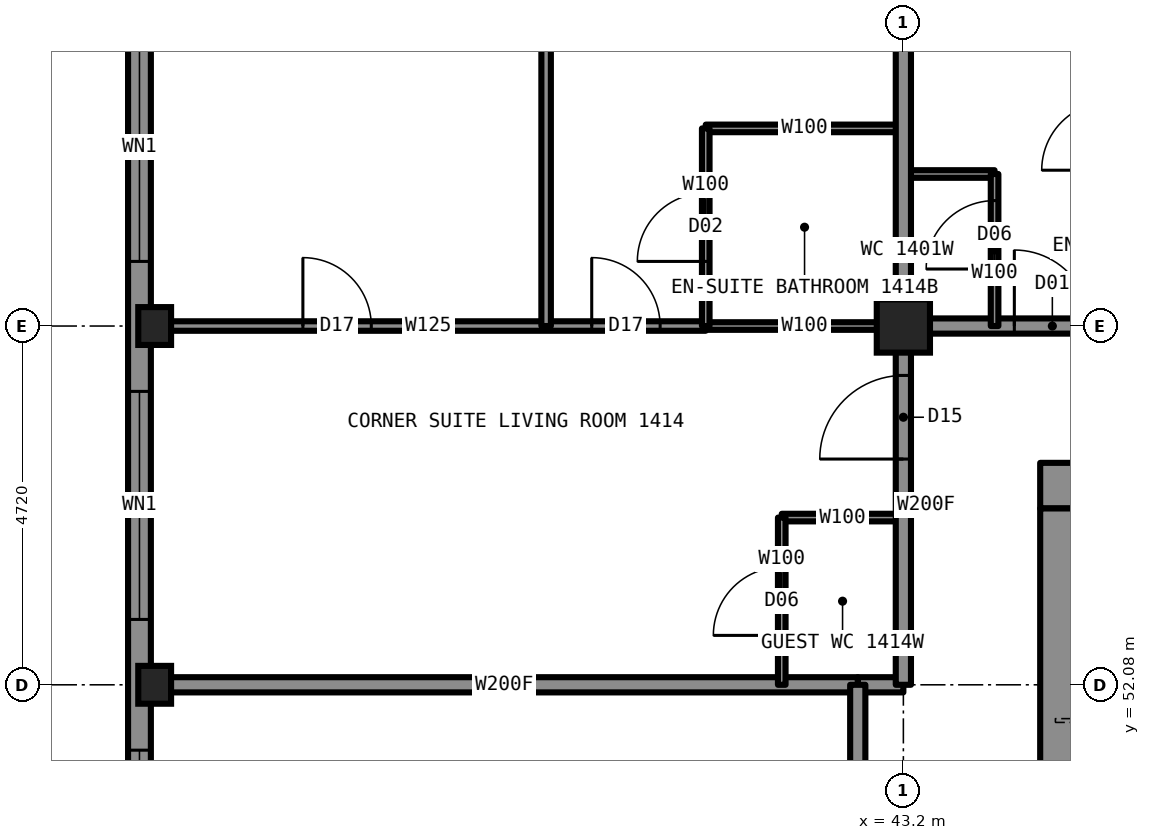
"""IFC4 building model, lengths in metres.
Left out: names, types, materials, properties, quantities, classifications, styles, units other than length and angle.
Written with IfcOpenShell. Run it as: python <this file> out.ifc"""

import sys

from ifc_helpers import new_model, si_unit, direction, frame, frame_2d, origin, origin_2d, place, context, subcontext, project, spatial, rectangle, hollow_rectangle, i_section, extrude, element, fill, save


model = new_model("IFC4")
c1 = context("Model", 3, precision=1e-05, world=origin(), true_north=direction((0.0, 1.0)))
c2 = subcontext(c1, "Body", "Model", "MODEL_VIEW")
j1 = project(units=[si_unit("LENGTHUNIT", "METRE"), si_unit("PLANEANGLEUNIT", "RADIAN")], contexts=[c1])
p1 = place(None, origin())
s1 = spatial("IfcSite", under=j1, at=p1, CompositionType="ELEMENT")
p2 = place(p1, origin())
s2 = spatial("IfcBuilding", under=s1, at=p2, CompositionType="ELEMENT")
p3 = place(p2, frame((0.0, 0.0, 49.5)))
s3 = spatial("IfcBuildingStorey", under=s2, at=p3, CompositionType="ELEMENT", Elevation=49.5)
for number, where, z_axis, x_axis in (
    (1, (33.35, 52.08, 0.0), (0.0, 0.0, 1.0), (1.0, 0.0, 0.0)),
    (2, (33.35, 56.8, 0.0), (0.0, 0.0, 1.0), (1.0, 0.0, 0.0)),
):
    element("IfcColumn", number, at=place(p3, frame(where, z_axis=z_axis, x_axis=x_axis)), inside=s3, PredefinedType="COLUMN", context=c2, shape_type="SweptSolid", body=[
        extrude(i_section(OverallWidth=0.432, OverallDepth=0.498, WebThickness=0.056, FlangeThickness=0.089, at=origin_2d()), origin(), (0.0, 0.0, 1.0), 3.5),
    ])
p4 = place(p3, frame((43.2, 56.8, 0.0), z_axis=(0.0, 0.0, 1.0), x_axis=(1.0, 0.0, 0.0)))
e3 = element("IfcColumn", 3, at=p4, inside=s3, PredefinedType="COLUMN", context=c2, shape_type="SweptSolid", body=[
    extrude(hollow_rectangle(XDim=0.7, YDim=0.7, WallThickness=0.06, at=origin_2d()), origin(), (0.0, 0.0, 1.0), 3.5),
])
p5 = place(p3, frame((45.0, 54.7, 0.0), z_axis=(0.0, 0.0, 1.0), x_axis=(1.0, 0.0, 0.0)))
e4 = element("IfcWall", 4, at=p5, inside=s3, PredefinedType="SHEAR", context=c2, shape_type="SweptSolid", body=[
    extrude(rectangle(XDim=20.0, YDim=0.6, at=frame_2d((10.0, 0.0))), origin(), (0.0, 0.0, 1.0), 3.5),
])
p6 = place(p3, frame((45.3, 35.6, 0.0), z_axis=(0.0, 0.0, 1.0), x_axis=(0.0, 1.0, 0.0)))
e5 = element("IfcWall", 5, at=p6, inside=s3, PredefinedType="SHEAR", context=c2, shape_type="SweptSolid", body=[
    extrude(rectangle(XDim=18.8, YDim=0.6, at=frame_2d((9.4, 0.0))), origin(), (0.0, 0.0, 1.0), 3.5),
])
p7 = place(p6, frame((13.4, 0.0, 0.0)))
e6 = element("IfcOpeningElement", 6, at=p7, cuts=e5, PredefinedType="OPENING", context=c2, shape_type="SweptSolid", body=[
    extrude(rectangle(XDim=1.8, YDim=2.2, at=frame_2d((0.9, 1.1))), frame((0.0, 0.31, 0.0), z_axis=(0.0, -1.0, 0.0), x_axis=(1.0, 0.0, 0.0)), (0.0, 0.0, 1.0), 0.62),
])
p8 = place(p6, frame((3.6, 0.0, 0.0)))
e7 = element("IfcOpeningElement", 7, at=p8, cuts=e5, PredefinedType="OPENING", context=c2, shape_type="SweptSolid", body=[
    extrude(rectangle(XDim=1.8, YDim=2.2, at=frame_2d((0.9, 1.1))), frame((0.0, 0.31, 0.0), z_axis=(0.0, -1.0, 0.0), x_axis=(1.0, 0.0, 0.0)), (0.0, 0.0, 1.0), 0.62),
])
p9 = place(p6, frame((6.4, 0.0, 0.0)))
e8 = element("IfcOpeningElement", 8, at=p9, cuts=e5, PredefinedType="OPENING", context=c2, shape_type="SweptSolid", body=[
    extrude(rectangle(XDim=1.2, YDim=2.2, at=frame_2d((0.6, 1.1))), frame((0.0, 0.31, 0.0), z_axis=(0.0, -1.0, 0.0), x_axis=(1.0, 0.0, 0.0)), (0.0, 0.0, 1.0), 0.62),
])
p10 = place(p3, frame((40.6, 56.8, 0.0), z_axis=(0.0, 0.0, 1.0), x_axis=(1.0, 0.0, 0.0)))
e9 = element("IfcWall", 9, at=p10, inside=s3, PredefinedType="PARTITIONING", context=c2, shape_type="SweptSolid", body=[
    extrude(rectangle(XDim=2.6, YDim=0.1, at=frame_2d((1.3, 0.0))), origin(), (0.0, 0.0, 1.0), 2.573),
])
p11 = place(p3, frame((43.2, 56.8, 0.0), z_axis=(0.0, 0.0, 1.0), x_axis=(1.0, 0.0, 0.0)))
e10 = element("IfcWall", 10, at=p11, inside=s3, PredefinedType="PARTITIONING", context=c2, shape_type="SweptSolid", body=[
    extrude(rectangle(XDim=23.6, YDim=0.2, at=frame_2d((11.8, 0.0))), origin(), (0.0, 0.0, 1.0), 3.33),
])
p12 = place(p11, frame((1.46, 0.0, 0.0)))
e11 = element("IfcOpeningElement", 11, at=p12, cuts=e10, PredefinedType="OPENING", context=c2, shape_type="SweptSolid", body=[
    extrude(rectangle(XDim=1.0, YDim=2.2, at=frame_2d((0.5, 1.1))), frame((0.0, 0.11, 0.0), z_axis=(0.0, -1.0, 0.0), x_axis=(1.0, 0.0, 0.0)), (0.0, 0.0, 1.0), 0.22),
])
p13 = place(p11, frame((7.27, 0.0, 0.0)))
e12 = element("IfcOpeningElement", 12, at=p13, cuts=e10, PredefinedType="OPENING", context=c2, shape_type="SweptSolid", body=[
    extrude(rectangle(XDim=1.0, YDim=2.2, at=frame_2d((0.5, 1.1))), frame((0.0, 0.11, 0.0), z_axis=(0.0, -1.0, 0.0), x_axis=(1.0, 0.0, 0.0)), (0.0, 0.0, 1.0), 0.22),
])
p14 = place(p11, frame((11.7, 0.0, 0.0)))
e13 = element("IfcOpeningElement", 13, at=p14, cuts=e10, PredefinedType="OPENING", context=c2, shape_type="SweptSolid", body=[
    extrude(rectangle(XDim=1.0, YDim=2.2, at=frame_2d((0.5, 1.1))), frame((0.0, 0.11, 0.0), z_axis=(0.0, -1.0, 0.0), x_axis=(1.0, 0.0, 0.0)), (0.0, 0.0, 1.0), 0.22),
])
p15 = place(p11, frame((17.16, 0.0, 0.0)))
e14 = element("IfcOpeningElement", 14, at=p15, cuts=e10, PredefinedType="OPENING", context=c2, shape_type="SweptSolid", body=[
    extrude(rectangle(XDim=1.0, YDim=2.2, at=frame_2d((0.5, 1.1))), frame((0.0, 0.11, 0.0), z_axis=(0.0, -1.0, 0.0), x_axis=(1.0, 0.0, 0.0)), (0.0, 0.0, 1.0), 0.22),
])
p16 = place(p3, frame((33.3, 56.8, 0.0), z_axis=(0.0, 0.0, 1.0), x_axis=(1.0, 0.0, 0.0)))
e15 = element("IfcWall", 15, at=p16, inside=s3, PredefinedType="PARTITIONING", context=c2, shape_type="SweptSolid", body=[
    extrude(rectangle(XDim=7.3, YDim=0.125, at=frame_2d((3.65, 0.0))), origin(), (0.0, 0.0, 1.0), 2.573),
])
p17 = place(p16, frame((5.8, 0.0, 0.0)))
e16 = element("IfcOpeningElement", 16, at=p17, cuts=e15, PredefinedType="OPENING", context=c2, shape_type="SweptSolid", body=[
    extrude(rectangle(XDim=0.9, YDim=2.2, at=frame_2d((0.45, 1.1))), frame((0.0, 0.073, 0.0), z_axis=(0.0, -1.0, 0.0), x_axis=(1.0, 0.0, 0.0)), (0.0, 0.0, 1.0), 0.145),
])
p18 = place(p16, frame((2.0, 0.0, 0.0)))
e17 = element("IfcOpeningElement", 17, at=p18, cuts=e15, PredefinedType="OPENING", context=c2, shape_type="SweptSolid", body=[
    extrude(rectangle(XDim=0.9, YDim=2.2, at=frame_2d((0.45, 1.1))), frame((0.0, 0.073, 0.0), z_axis=(0.0, -1.0, 0.0), x_axis=(1.0, 0.0, 0.0)), (0.0, 0.0, 1.0), 0.145),
])
p19 = place(p3, frame((43.2, 58.8, 0.0), z_axis=(0.0, 0.0, 1.0), x_axis=(1.0, 0.0, 0.0)))
e18 = element("IfcWall", 18, at=p19, inside=s3, PredefinedType="PARTITIONING", context=c2, shape_type="SweptSolid", body=[
    extrude(rectangle(XDim=1.2, YDim=0.1, at=frame_2d((0.6, 0.0))), origin(), (0.0, 0.0, 1.0), 3.33),
])
p20 = place(p3, frame((40.6, 59.4, 0.0), z_axis=(0.0, 0.0, 1.0), x_axis=(1.0, 0.0, 0.0)))
e19 = element("IfcWall", 19, at=p20, inside=s3, PredefinedType="PARTITIONING", context=c2, shape_type="SweptSolid", body=[
    extrude(rectangle(XDim=2.6, YDim=0.1, at=frame_2d((1.3, 0.0))), origin(), (0.0, 0.0, 1.0), 3.33),
])
p21 = place(p3, frame((42.6, 52.08, 0.0), z_axis=(0.0, 0.0, 1.0), x_axis=(1.0, 0.0, 0.0)))
e20 = element("IfcWall", 20, at=p21, inside=s3, PredefinedType="PARTITIONING", context=c2, shape_type="SweptSolid", body=[
    extrude(rectangle(XDim=0.6, YDim=0.2, at=frame_2d((0.3, 0.0))), origin(), (0.0, 0.0, 1.0), 2.573),
])
p22 = place(p3, frame((33.3, 52.08, 0.0), z_axis=(0.0, 0.0, 1.0), x_axis=(1.0, 0.0, 0.0)))
e21 = element("IfcWall", 21, at=p22, inside=s3, PredefinedType="PARTITIONING", context=c2, shape_type="SweptSolid", body=[
    extrude(rectangle(XDim=9.3, YDim=0.2, at=frame_2d((4.65, 0.0))), origin(), (0.0, 0.0, 1.0), 2.573),
])
p23 = place(p3, frame((41.6, 54.28, 0.0), z_axis=(0.0, 0.0, 1.0), x_axis=(1.0, 0.0, 0.0)))
e22 = element("IfcWall", 22, at=p23, inside=s3, PredefinedType="PARTITIONING", context=c2, shape_type="SweptSolid", body=[
    extrude(rectangle(XDim=1.6, YDim=0.1, at=frame_2d((0.8, 0.0))), origin(), (0.0, 0.0, 1.0), 2.723),
])
p24 = place(p3, frame((44.4, 56.8, 0.0), z_axis=(0.0, 0.0, 1.0), x_axis=(0.0, 1.0, 0.0)))
e23 = element("IfcWall", 23, at=p24, inside=s3, PredefinedType="PARTITIONING", context=c2, shape_type="SweptSolid", body=[
    extrude(rectangle(XDim=2.0, YDim=0.1, at=frame_2d((1.0, 0.0))), origin(), (0.0, 0.0, 1.0), 3.33),
])
p25 = place(p24, frame((0.75, 0.0, 0.0)))
e24 = element("IfcOpeningElement", 24, at=p25, cuts=e23, PredefinedType="OPENING", context=c2, shape_type="SweptSolid", body=[
    extrude(rectangle(XDim=0.9, YDim=2.1, at=frame_2d((0.45, 1.05))), frame((0.0, 0.06, 0.0), z_axis=(0.0, -1.0, 0.0), x_axis=(1.0, 0.0, 0.0)), (0.0, 0.0, 1.0), 0.12),
])
p26 = place(p3, frame((43.2, 52.08, 0.0), z_axis=(0.0, 0.0, 1.0), x_axis=(0.0, 1.0, 0.0)))
e25 = element("IfcWall", 25, at=p26, inside=s3, PredefinedType="PARTITIONING", context=c2, shape_type="SweptSolid", body=[
    extrude(rectangle(XDim=4.72, YDim=0.2, at=frame_2d((2.36, 0.0))), origin(), (0.0, 0.0, 1.0), 3.33),
])
p27 = place(p26, frame((2.97, 0.0, 0.0)))
e26 = element("IfcOpeningElement", 26, at=p27, cuts=e25, PredefinedType="OPENING", context=c2, shape_type="SweptSolid", body=[
    extrude(rectangle(XDim=1.1, YDim=2.2, at=frame_2d((0.55, 1.1))), frame((0.0, 0.11, 0.0), z_axis=(0.0, -1.0, 0.0), x_axis=(1.0, 0.0, 0.0)), (0.0, 0.0, 1.0), 0.22),
])
p28 = place(p3, frame((43.2, 56.8, 0.0), z_axis=(0.0, 0.0, 1.0), x_axis=(0.0, 1.0, 0.0)))
e27 = element("IfcWall", 27, at=p28, inside=s3, PredefinedType="PARTITIONING", context=c2, shape_type="SweptSolid", body=[
    extrude(rectangle(XDim=9.9, YDim=0.2, at=frame_2d((4.95, 0.0))), origin(), (0.0, 0.0, 1.0), 2.573),
])
p29 = place(p3, frame((42.6, 37.92, 0.0), z_axis=(0.0, 0.0, 1.0), x_axis=(0.0, 1.0, 0.0)))
e28 = element("IfcWall", 28, at=p29, inside=s3, PredefinedType="PARTITIONING", context=c2, shape_type="SweptSolid", body=[
    extrude(rectangle(XDim=14.16, YDim=0.2, at=frame_2d((7.08, 0.0))), origin(), (0.0, 0.0, 1.0), 3.33),
])
p30 = place(p29, frame((2.55, 0.0, 0.0)))
e29 = element("IfcOpeningElement", 29, at=p30, cuts=e28, PredefinedType="OPENING", context=c2, shape_type="SweptSolid", body=[
    extrude(rectangle(XDim=1.0, YDim=2.2, at=frame_2d((0.5, 1.1))), frame((0.0, 0.11, 0.0), z_axis=(0.0, -1.0, 0.0), x_axis=(1.0, 0.0, 0.0)), (0.0, 0.0, 1.0), 0.22),
])
p31 = place(p29, frame((6.18, 0.0, 0.0)))
e30 = element("IfcOpeningElement", 30, at=p31, cuts=e28, PredefinedType="OPENING", context=c2, shape_type="SweptSolid", body=[
    extrude(rectangle(XDim=1.0, YDim=2.2, at=frame_2d((0.5, 1.1))), frame((0.0, 0.11, 0.0), z_axis=(0.0, -1.0, 0.0), x_axis=(1.0, 0.0, 0.0)), (0.0, 0.0, 1.0), 0.22),
])
p32 = place(p29, frame((11.99, 0.0, 0.0)))
e31 = element("IfcOpeningElement", 31, at=p32, cuts=e28, PredefinedType="OPENING", context=c2, shape_type="SweptSolid", body=[
    extrude(rectangle(XDim=1.0, YDim=2.2, at=frame_2d((0.5, 1.1))), frame((0.0, 0.11, 0.0), z_axis=(0.0, -1.0, 0.0), x_axis=(1.0, 0.0, 0.0)), (0.0, 0.0, 1.0), 0.22),
])
p33 = place(p3, frame((41.6, 52.08, 0.0), z_axis=(0.0, 0.0, 1.0), x_axis=(0.0, 1.0, 0.0)))
e32 = element("IfcWall", 32, at=p33, inside=s3, PredefinedType="PARTITIONING", context=c2, shape_type="SweptSolid", body=[
    extrude(rectangle(XDim=2.2, YDim=0.1, at=frame_2d((1.1, 0.0))), origin(), (0.0, 0.0, 1.0), 3.33),
])
p34 = place(p33, frame((0.65, 0.0, 0.0)))
e33 = element("IfcOpeningElement", 33, at=p34, cuts=e32, PredefinedType="OPENING", context=c2, shape_type="SweptSolid", body=[
    extrude(rectangle(XDim=0.9, YDim=2.1, at=frame_2d((0.45, 1.05))), frame((0.0, 0.06, 0.0), z_axis=(0.0, -1.0, 0.0), x_axis=(1.0, 0.0, 0.0)), (0.0, 0.0, 1.0), 0.12),
])
p35 = place(p3, frame((40.6, 56.8, 0.0), z_axis=(0.0, 0.0, 1.0), x_axis=(0.0, 1.0, 0.0)))
e34 = element("IfcWall", 34, at=p35, inside=s3, PredefinedType="PARTITIONING", context=c2, shape_type="SweptSolid", body=[
    extrude(rectangle(XDim=2.6, YDim=0.1, at=frame_2d((1.3, 0.0))), origin(), (0.0, 0.0, 1.0), 3.33),
])
p36 = place(p35, frame((0.85, 0.0, 0.0)))
e35 = element("IfcOpeningElement", 35, at=p36, cuts=e34, PredefinedType="OPENING", context=c2, shape_type="SweptSolid", body=[
    extrude(rectangle(XDim=0.9, YDim=2.1, at=frame_2d((0.45, 1.05))), frame((0.0, 0.06, 0.0), z_axis=(0.0, -1.0, 0.0), x_axis=(1.0, 0.0, 0.0)), (0.0, 0.0, 1.0), 0.12),
])
p37 = place(p3, frame((38.5, 56.8, 0.0), z_axis=(0.0, 0.0, 1.0), x_axis=(0.0, 1.0, 0.0)))
e36 = element("IfcWall", 36, at=p37, inside=s3, PredefinedType="PARTITIONING", context=c2, shape_type="SweptSolid", body=[
    extrude(rectangle(XDim=9.894, YDim=0.125, at=frame_2d((4.947, 0.0))), origin(), (0.0, 0.0, 1.0), 3.33),
])
p38 = place(p3, frame((33.15, 61.5, 0.0), z_axis=(0.0, 0.0, 1.0), x_axis=(0.0, -1.0, 0.0)))
e37 = element("IfcWall", 37, at=p38, inside=s3, PredefinedType="SOLIDWALL", context=c2, shape_type="SweptSolid", body=[
    extrude(rectangle(XDim=33.0, YDim=0.3, at=frame_2d((16.5, 0.0))), origin(), (0.0, 0.0, 1.0), 2.83),
])
p39 = place(p38, frame((0.85, 0.0, 0.5)))
e38 = element("IfcOpeningElement", 38, at=p39, cuts=e37, PredefinedType="OPENING", context=c2, shape_type="SweptSolid", body=[
    extrude(rectangle(XDim=3.0, YDim=2.0, at=frame_2d((1.5, 1.0))), frame((0.0, 0.16, 0.0), z_axis=(0.0, -1.0, 0.0), x_axis=(1.0, 0.0, 0.0)), (0.0, 0.0, 1.0), 0.32),
])
p40 = place(p38, frame((5.56, 0.0, 0.5)))
e39 = element("IfcOpeningElement", 39, at=p40, cuts=e37, PredefinedType="OPENING", context=c2, shape_type="SweptSolid", body=[
    extrude(rectangle(XDim=3.0, YDim=2.0, at=frame_2d((1.5, 1.0))), frame((0.0, 0.16, 0.0), z_axis=(0.0, -1.0, 0.0), x_axis=(1.0, 0.0, 0.0)), (0.0, 0.0, 1.0), 0.32),
])
p41 = place(p38, frame((10.28, 0.0, 1.1)))
e40 = element("IfcOpeningElement", 40, at=p41, cuts=e37, PredefinedType="OPENING", context=c2, shape_type="SweptSolid", body=[
    extrude(rectangle(XDim=1.1, YDim=1.4, at=frame_2d((0.55, 0.7))), frame((0.0, 0.16, 0.0), z_axis=(0.0, -1.0, 0.0), x_axis=(1.0, 0.0, 0.0)), (0.0, 0.0, 1.0), 0.32),
])
p42 = place(p38, frame((15.0, 0.0, 0.5)))
e41 = element("IfcOpeningElement", 41, at=p42, cuts=e37, PredefinedType="OPENING", context=c2, shape_type="SweptSolid", body=[
    extrude(rectangle(XDim=3.0, YDim=2.0, at=frame_2d((1.5, 1.0))), frame((0.0, 0.16, 0.0), z_axis=(0.0, -1.0, 0.0), x_axis=(1.0, 0.0, 0.0)), (0.0, 0.0, 1.0), 0.32),
])
p43 = place(p38, frame((21.62, 0.0, 1.1)))
e42 = element("IfcOpeningElement", 42, at=p43, cuts=e37, PredefinedType="OPENING", context=c2, shape_type="SweptSolid", body=[
    extrude(rectangle(XDim=1.1, YDim=1.4, at=frame_2d((0.55, 0.7))), frame((0.0, 0.16, 0.0), z_axis=(0.0, -1.0, 0.0), x_axis=(1.0, 0.0, 0.0)), (0.0, 0.0, 1.0), 0.32),
])
p44 = place(p38, frame((24.44, 0.0, 0.5)))
e43 = element("IfcOpeningElement", 43, at=p44, cuts=e37, PredefinedType="OPENING", context=c2, shape_type="SweptSolid", body=[
    extrude(rectangle(XDim=3.0, YDim=2.0, at=frame_2d((1.5, 1.0))), frame((0.0, 0.16, 0.0), z_axis=(0.0, -1.0, 0.0), x_axis=(1.0, 0.0, 0.0)), (0.0, 0.0, 1.0), 0.32),
])
p45 = place(p38, frame((29.15, 0.0, 0.5)))
e44 = element("IfcOpeningElement", 44, at=p45, cuts=e37, PredefinedType="OPENING", context=c2, shape_type="SweptSolid", body=[
    extrude(rectangle(XDim=3.0, YDim=2.0, at=frame_2d((1.5, 1.0))), frame((0.0, 0.16, 0.0), z_axis=(0.0, -1.0, 0.0), x_axis=(1.0, 0.0, 0.0)), (0.0, 0.0, 1.0), 0.32),
])
p46 = place(p12, origin())
e45 = element("IfcDoor", 45, at=p46, inside=s3, OperationType="SINGLE_SWING_LEFT", PredefinedType="DOOR", context=c2, shape_type="SweptSolid", body=[
    extrude(rectangle(XDim=1.0, YDim=2.2, at=frame_2d((0.5, 1.1))), frame((0.0, 0.025, 0.0), z_axis=(0.0, -1.0, 0.0), x_axis=(1.0, 0.0, 0.0)), (0.0, 0.0, 1.0), 0.05),
])
fill(e11, e45)
p47 = place(p25, origin())
e46 = element("IfcDoor", 46, at=p47, inside=s3, OperationType="SINGLE_SWING_LEFT", PredefinedType="DOOR", context=c2, shape_type="SweptSolid", body=[
    extrude(rectangle(XDim=0.9, YDim=2.1, at=frame_2d((0.45, 1.05))), frame((0.0, 0.025, 0.0), z_axis=(0.0, -1.0, 0.0), x_axis=(1.0, 0.0, 0.0)), (0.0, 0.0, 1.0), 0.05),
])
fill(e24, e46)
p48 = place(p27, origin())
e47 = element("IfcDoor", 47, at=p48, inside=s3, OperationType="SINGLE_SWING_LEFT", PredefinedType="DOOR", context=c2, shape_type="SweptSolid", body=[
    extrude(rectangle(XDim=1.1, YDim=2.2, at=frame_2d((0.55, 1.1))), frame((0.0, 0.025, 0.0), z_axis=(0.0, -1.0, 0.0), x_axis=(1.0, 0.0, 0.0)), (0.0, 0.0, 1.0), 0.05),
])
fill(e26, e47)
p49 = place(p36, origin())
e48 = element("IfcDoor", 48, at=p49, inside=s3, OperationType="SINGLE_SWING_RIGHT", PredefinedType="DOOR", context=c2, shape_type="SweptSolid", body=[
    extrude(rectangle(XDim=0.9, YDim=2.1, at=frame_2d((0.45, 1.05))), frame((0.0, 0.025, 0.0), z_axis=(0.0, -1.0, 0.0), x_axis=(1.0, 0.0, 0.0)), (0.0, 0.0, 1.0), 0.05),
])
fill(e35, e48)
p50 = place(p17, origin())
e49 = element("IfcDoor", 49, at=p50, inside=s3, OperationType="SINGLE_SWING_LEFT", PredefinedType="DOOR", context=c2, shape_type="SweptSolid", body=[
    extrude(rectangle(XDim=0.9, YDim=2.2, at=frame_2d((0.45, 1.1))), frame((0.0, 0.025, 0.0), z_axis=(0.0, -1.0, 0.0), x_axis=(1.0, 0.0, 0.0)), (0.0, 0.0, 1.0), 0.05),
])
fill(e16, e49)
p51 = place(p18, origin())
e50 = element("IfcDoor", 50, at=p51, inside=s3, OperationType="SINGLE_SWING_LEFT", PredefinedType="DOOR", context=c2, shape_type="SweptSolid", body=[
    extrude(rectangle(XDim=0.9, YDim=2.2, at=frame_2d((0.45, 1.1))), frame((0.0, 0.025, 0.0), z_axis=(0.0, -1.0, 0.0), x_axis=(1.0, 0.0, 0.0)), (0.0, 0.0, 1.0), 0.05),
])
fill(e17, e50)
p52 = place(p34, origin())
e51 = element("IfcDoor", 51, at=p52, inside=s3, OperationType="SINGLE_SWING_LEFT", PredefinedType="DOOR", context=c2, shape_type="SweptSolid", body=[
    extrude(rectangle(XDim=0.9, YDim=2.1, at=frame_2d((0.45, 1.05))), frame((0.0, 0.025, 0.0), z_axis=(0.0, -1.0, 0.0), x_axis=(1.0, 0.0, 0.0)), (0.0, 0.0, 1.0), 0.05),
])
fill(e33, e51)
p53 = place(p39, origin())
e52 = element("IfcWindow", 52, at=p53, inside=s3, PartitioningType="SINGLE_PANEL", PredefinedType="WINDOW", context=c2, shape_type="SweptSolid", body=[
    extrude(rectangle(XDim=3.0, YDim=2.0, at=frame_2d((1.5, 1.0))), frame((0.0, 0.03, 0.0), z_axis=(0.0, -1.0, 0.0), x_axis=(1.0, 0.0, 0.0)), (0.0, 0.0, 1.0), 0.06),
])
fill(e38, e52)
p54 = place(p40, origin())
e53 = element("IfcWindow", 53, at=p54, inside=s3, PartitioningType="SINGLE_PANEL", PredefinedType="WINDOW", context=c2, shape_type="SweptSolid", body=[
    extrude(rectangle(XDim=3.0, YDim=2.0, at=frame_2d((1.5, 1.0))), frame((0.0, 0.03, 0.0), z_axis=(0.0, -1.0, 0.0), x_axis=(1.0, 0.0, 0.0)), (0.0, 0.0, 1.0), 0.06),
])
fill(e39, e53)
p55 = place(p41, origin())
e54 = element("IfcWindow", 54, at=p55, inside=s3, PartitioningType="SINGLE_PANEL", PredefinedType="WINDOW", context=c2, shape_type="SweptSolid", body=[
    extrude(rectangle(XDim=1.1, YDim=1.4, at=frame_2d((0.55, 0.7))), frame((0.0, 0.03, 0.0), z_axis=(0.0, -1.0, 0.0), x_axis=(1.0, 0.0, 0.0)), (0.0, 0.0, 1.0), 0.06),
])
fill(e40, e54)
save(model, sys.argv[1])
